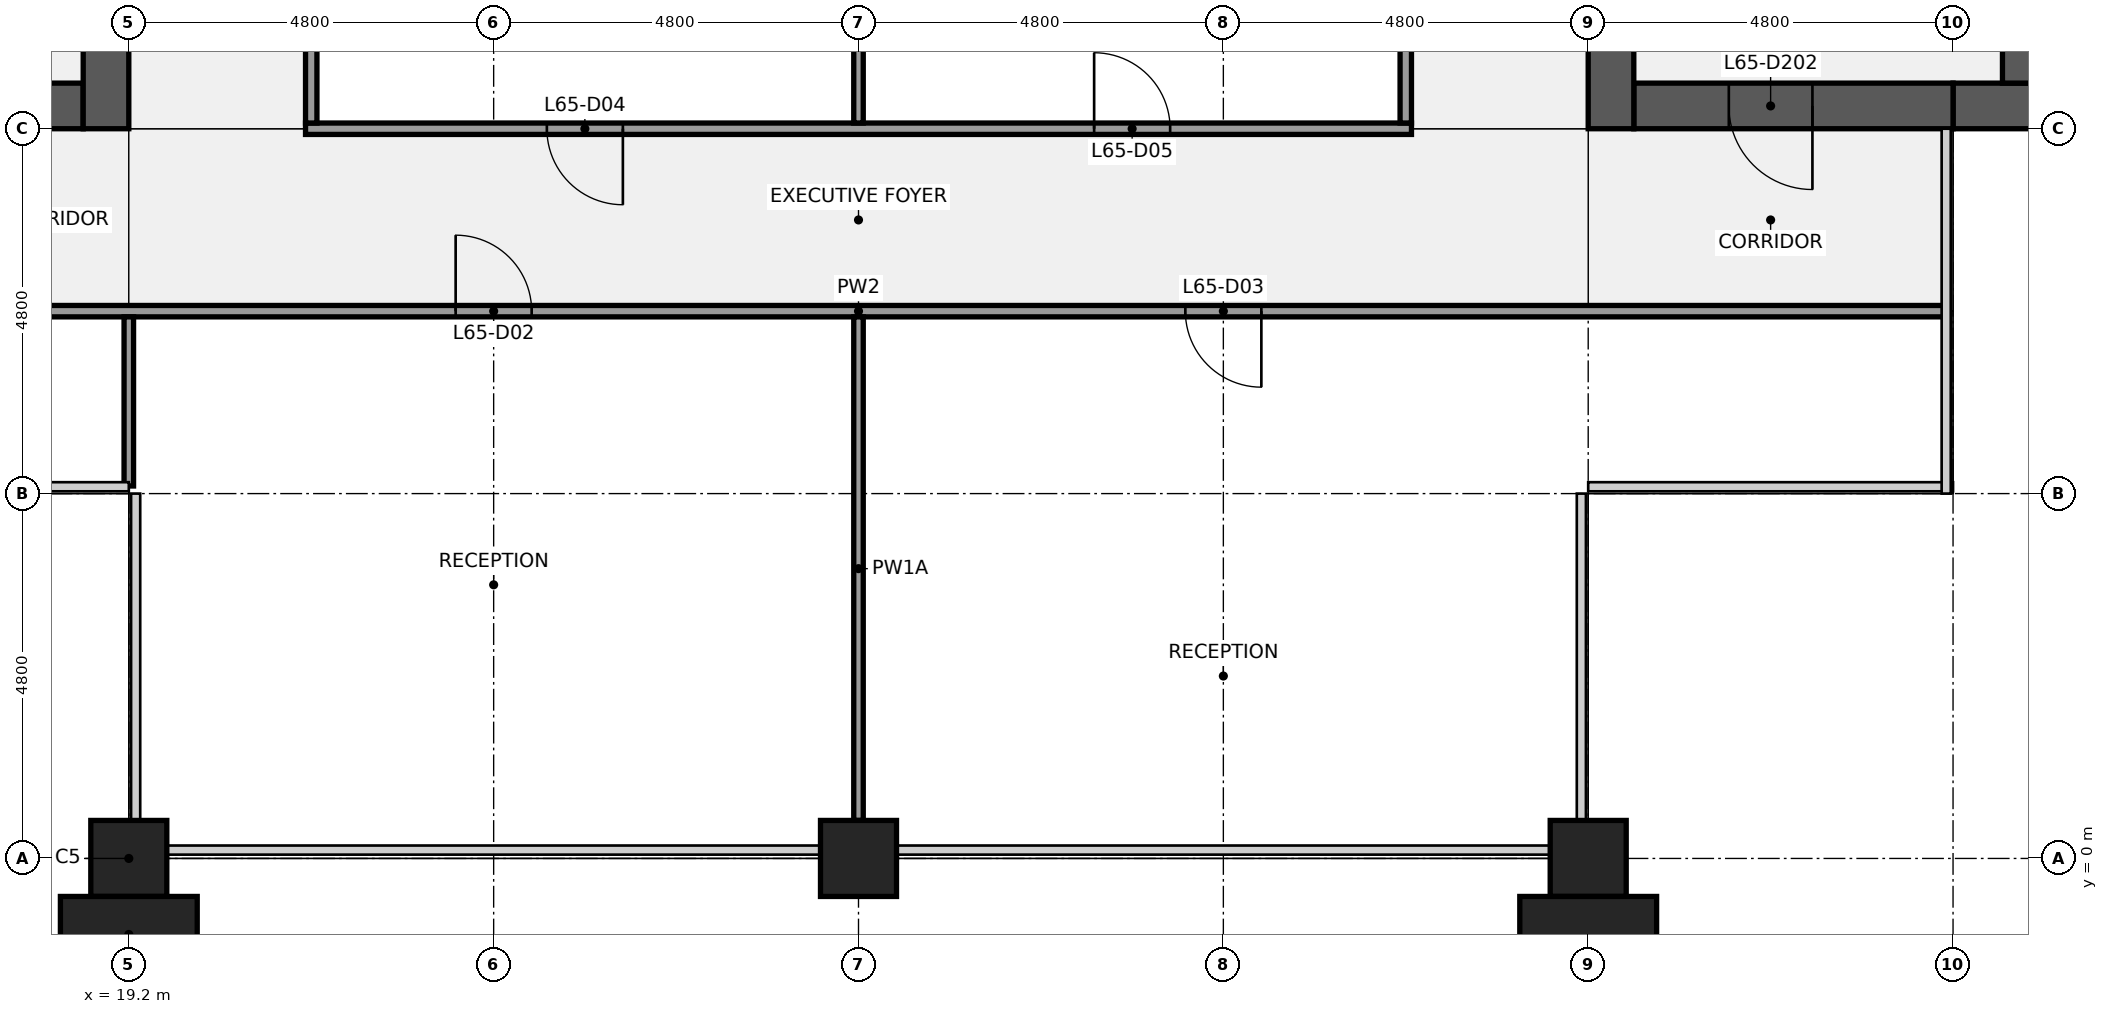
"""IFC4 building model, lengths in metres.
Left out: names, types, materials, properties, quantities, classifications, styles, units other than length and angle.
Written with IfcOpenShell. Run it as: python <this file> out.ifc"""

import sys

from ifc_helpers import new_model, si_unit, direction, frame, frame_2d, origin, origin_2d, place, context, subcontext, project, spatial, rectangle, extrude, element, fill, save


model = new_model("IFC4")
c1 = context("Model", 3, precision=1e-05, world=origin(), true_north=direction((0.0, 1.0)))
c2 = subcontext(c1, "Body", "Model", "MODEL_VIEW")
j1 = project(units=[si_unit("LENGTHUNIT", "METRE"), si_unit("PLANEANGLEUNIT", "RADIAN")], contexts=[c1])
p1 = place(None, origin())
s1 = spatial("IfcSite", under=j1, at=p1, CompositionType="ELEMENT")
p2 = place(p1, origin())
s2 = spatial("IfcBuilding", under=s1, at=p2, CompositionType="ELEMENT")
p3 = place(p2, frame((0.0, 0.0, 298.3)))
s3 = spatial("IfcBuildingStorey", under=s2, at=p3, CompositionType="ELEMENT", Elevation=298.3)
for number, where, z_axis, x_axis in (
    (1, (19.2, 0.0, 0.0), (0.0, 0.0, 1.0), (1.0, 0.0, 0.0)),
    (2, (28.8, 0.0, 0.0), (0.0, 0.0, 1.0), (1.0, 0.0, 0.0)),
    (3, (38.4, 0.0, 0.0), (0.0, 0.0, 1.0), (1.0, 0.0, 0.0)),
):
    element("IfcColumn", number, at=place(p3, frame(where, z_axis=z_axis, x_axis=x_axis)), inside=s3, PredefinedType="COLUMN", context=c2, shape_type="SweptSolid", body=[
        extrude(rectangle(XDim=1.0, YDim=1.0, at=origin_2d()), origin(), (0.0, 0.0, 1.0), 4.0),
    ])
p4 = place(p3, frame((18.6, 9.9, 0.0), z_axis=(0.0, 0.0, 1.0), x_axis=(-1.0, 0.0, 0.0)))
e4 = element("IfcWall", 4, at=p4, inside=s3, PredefinedType="SHEAR", context=c2, shape_type="SweptSolid", body=[
    extrude(rectangle(XDim=4.2, YDim=0.6, at=frame_2d((2.1, 0.0))), origin(), (0.0, 0.0, 1.0), 3.84),
])
p5 = place(p4, frame((1.25, 0.0, 0.0)))
e5 = element("IfcOpeningElement", 5, at=p5, cuts=e4, PredefinedType="OPENING", context=c2, shape_type="SweptSolid", body=[
    extrude(rectangle(XDim=1.1, YDim=2.1, at=frame_2d((0.55, 1.05))), frame((0.0, 0.31, 0.0), z_axis=(0.0, -1.0, 0.0), x_axis=(1.0, 0.0, 0.0)), (0.0, 0.0, 1.0), 0.62),
])
p6 = place(p3, frame((18.9, 38.4, 0.0), z_axis=(0.0, 0.0, 1.0), x_axis=(0.0, -1.0, 0.0)))
e6 = element("IfcWall", 6, at=p6, inside=s3, PredefinedType="SHEAR", context=c2, shape_type="SweptSolid", body=[
    extrude(rectangle(XDim=28.8, YDim=0.6, at=frame_2d((14.4, 0.0))), origin(), (0.0, 0.0, 1.0), 3.84),
])
p7 = place(p6, frame((18.3, 0.0, 0.0)))
e7 = element("IfcOpeningElement", 7, at=p7, cuts=e6, PredefinedType="OPENING", context=c2, shape_type="SweptSolid", body=[
    extrude(rectangle(XDim=1.8, YDim=2.1, at=frame_2d((0.9, 1.05))), frame((0.0, 0.31, 0.0), z_axis=(0.0, -1.0, 0.0), x_axis=(1.0, 0.0, 0.0)), (0.0, 0.0, 1.0), 0.62),
])
p8 = place(p6, frame((8.7, 0.0, 0.0)))
e8 = element("IfcOpeningElement", 8, at=p8, cuts=e6, PredefinedType="OPENING", context=c2, shape_type="SweptSolid", body=[
    extrude(rectangle(XDim=1.8, YDim=2.1, at=frame_2d((0.9, 1.05))), frame((0.0, 0.31, 0.0), z_axis=(0.0, -1.0, 0.0), x_axis=(1.0, 0.0, 0.0)), (0.0, 0.0, 1.0), 0.62),
])
p9 = place(p3, frame((57.0, 9.9, 0.0), z_axis=(0.0, 0.0, 1.0), x_axis=(-1.0, 0.0, 0.0)))
e9 = element("IfcWall", 9, at=p9, inside=s3, PredefinedType="SHEAR", context=c2, shape_type="SweptSolid", body=[
    extrude(rectangle(XDim=13.8, YDim=0.6, at=frame_2d((6.9, 0.0))), origin(), (0.0, 0.0, 1.0), 3.84),
])
p10 = place(p9, frame((5.7, 0.0, 0.9)))
e10 = element("IfcOpeningElement", 10, at=p10, cuts=e9, PredefinedType="OPENING", context=c2, shape_type="SweptSolid", body=[
    extrude(rectangle(XDim=1.8, YDim=1.5, at=frame_2d((0.9, 0.75))), frame((0.0, 0.31, 0.0), z_axis=(0.0, -1.0, 0.0), x_axis=(1.0, 0.0, 0.0)), (0.0, 0.0, 1.0), 0.62),
])
p11 = place(p9, frame((10.5, 0.0, 0.9)))
e11 = element("IfcOpeningElement", 11, at=p11, cuts=e9, PredefinedType="OPENING", context=c2, shape_type="SweptSolid", body=[
    extrude(rectangle(XDim=1.8, YDim=1.5, at=frame_2d((0.9, 0.75))), frame((0.0, 0.31, 0.0), z_axis=(0.0, -1.0, 0.0), x_axis=(1.0, 0.0, 0.0)), (0.0, 0.0, 1.0), 0.62),
])
p12 = place(p3, frame((43.2, 9.9, 0.0), z_axis=(0.0, 0.0, 1.0), x_axis=(-1.0, 0.0, 0.0)))
e12 = element("IfcWall", 12, at=p12, inside=s3, PredefinedType="SHEAR", context=c2, shape_type="SweptSolid", body=[
    extrude(rectangle(XDim=4.2, YDim=0.6, at=frame_2d((2.1, 0.0))), origin(), (0.0, 0.0, 1.0), 3.84),
])
p13 = place(p12, frame((1.85, 0.0, 0.0)))
e13 = element("IfcOpeningElement", 13, at=p13, cuts=e12, PredefinedType="OPENING", context=c2, shape_type="SweptSolid", body=[
    extrude(rectangle(XDim=1.1, YDim=2.1, at=frame_2d((0.55, 1.05))), frame((0.0, 0.31, 0.0), z_axis=(0.0, -1.0, 0.0), x_axis=(1.0, 0.0, 0.0)), (0.0, 0.0, 1.0), 0.62),
])
p14 = place(p3, frame((38.7, 9.6, 0.0), z_axis=(0.0, 0.0, 1.0), x_axis=(0.0, 1.0, 0.0)))
e14 = element("IfcWall", 14, at=p14, inside=s3, PredefinedType="SHEAR", context=c2, shape_type="SweptSolid", body=[
    extrude(rectangle(XDim=28.8, YDim=0.6, at=frame_2d((14.4, 0.0))), origin(), (0.0, 0.0, 1.0), 3.84),
])
p15 = place(p14, frame((8.7, 0.0, 0.0)))
e15 = element("IfcOpeningElement", 15, at=p15, cuts=e14, PredefinedType="OPENING", context=c2, shape_type="SweptSolid", body=[
    extrude(rectangle(XDim=1.8, YDim=2.1, at=frame_2d((0.9, 1.05))), frame((0.0, 0.31, 0.0), z_axis=(0.0, -1.0, 0.0), x_axis=(1.0, 0.0, 0.0)), (0.0, 0.0, 1.0), 0.62),
])
p16 = place(p14, frame((18.3, 0.0, 0.0)))
e16 = element("IfcOpeningElement", 16, at=p16, cuts=e14, PredefinedType="OPENING", context=c2, shape_type="SweptSolid", body=[
    extrude(rectangle(XDim=1.8, YDim=2.1, at=frame_2d((0.9, 1.05))), frame((0.0, 0.31, 0.0), z_axis=(0.0, -1.0, 0.0), x_axis=(1.0, 0.0, 0.0)), (0.0, 0.0, 1.0), 0.62),
])
p17 = place(p3, frame((43.85, 10.5, 0.0), z_axis=(0.0, 0.0, 1.0), x_axis=(1.0, 0.0, 0.0)))
e17 = element("IfcWall", 17, at=p17, inside=s3, PredefinedType="SHEAR", context=c2, shape_type="SweptSolid", body=[
    extrude(rectangle(XDim=7.5, YDim=0.6, at=frame_2d((3.75, 0.0))), origin(), (0.0, 0.0, 1.0), 3.84),
])
p18 = place(p3, frame((14.5, 7.2, 0.0), z_axis=(0.0, 0.0, 1.0), x_axis=(1.0, 0.0, 0.0)))
e18 = element("IfcWall", 18, at=p18, inside=s3, PredefinedType="PARTITIONING", context=c2, shape_type="SweptSolid", body=[
    extrude(rectangle(XDim=28.6, YDim=0.15, at=frame_2d((14.3, 0.0))), origin(), (0.0, 0.0, 1.0), 2.849),
])
p19 = place(p18, frame((1.85, 0.0, 0.0)))
e19 = element("IfcOpeningElement", 19, at=p19, cuts=e18, PredefinedType="OPENING", context=c2, shape_type="SweptSolid", body=[
    extrude(rectangle(XDim=1.0, YDim=2.1, at=frame_2d((0.5, 1.05))), frame((0.0, 0.085, 0.0), z_axis=(0.0, -1.0, 0.0), x_axis=(1.0, 0.0, 0.0)), (0.0, 0.0, 1.0), 0.17),
])
p20 = place(p18, frame((9.0, 0.0, 0.0)))
e20 = element("IfcOpeningElement", 20, at=p20, cuts=e18, PredefinedType="OPENING", context=c2, shape_type="SweptSolid", body=[
    extrude(rectangle(XDim=1.0, YDim=2.1, at=frame_2d((0.5, 1.05))), frame((0.0, 0.085, 0.0), z_axis=(0.0, -1.0, 0.0), x_axis=(1.0, 0.0, 0.0)), (0.0, 0.0, 1.0), 0.17),
])
p21 = place(p18, frame((18.6, 0.0, 0.0)))
e21 = element("IfcOpeningElement", 21, at=p21, cuts=e18, PredefinedType="OPENING", context=c2, shape_type="SweptSolid", body=[
    extrude(rectangle(XDim=1.0, YDim=2.1, at=frame_2d((0.5, 1.05))), frame((0.0, 0.085, 0.0), z_axis=(0.0, -1.0, 0.0), x_axis=(1.0, 0.0, 0.0)), (0.0, 0.0, 1.0), 0.17),
])
p22 = place(p3, frame((21.525, 9.6, 0.0), z_axis=(0.0, 0.0, 1.0), x_axis=(1.0, 0.0, 0.0)))
e22 = element("IfcWall", 22, at=p22, inside=s3, PredefinedType="PARTITIONING", context=c2, shape_type="SweptSolid", body=[
    extrude(rectangle(XDim=14.55, YDim=0.15, at=frame_2d((7.275, 0.0))), origin(), (0.0, 0.0, 1.0), 2.849),
])
p23 = place(p22, frame((3.175, 0.0, 0.0)))
e23 = element("IfcOpeningElement", 23, at=p23, cuts=e22, PredefinedType="OPENING", context=c2, shape_type="SweptSolid", body=[
    extrude(rectangle(XDim=1.0, YDim=2.1, at=frame_2d((0.5, 1.05))), frame((0.0, 0.085, 0.0), z_axis=(0.0, -1.0, 0.0), x_axis=(1.0, 0.0, 0.0)), (0.0, 0.0, 1.0), 0.17),
])
p24 = place(p22, frame((10.375, 0.0, 0.0)))
e24 = element("IfcOpeningElement", 24, at=p24, cuts=e22, PredefinedType="OPENING", context=c2, shape_type="SweptSolid", body=[
    extrude(rectangle(XDim=1.0, YDim=2.1, at=frame_2d((0.5, 1.05))), frame((0.0, 0.085, 0.0), z_axis=(0.0, -1.0, 0.0), x_axis=(1.0, 0.0, 0.0)), (0.0, 0.0, 1.0), 0.17),
])
p25 = place(p3, frame((19.2, 4.9, 0.0), z_axis=(0.0, 0.0, 1.0), x_axis=(0.0, 1.0, 0.0)))
e25 = element("IfcWall", 25, at=p25, inside=s3, PredefinedType="PARTITIONING", context=c2, shape_type="SweptSolid", body=[
    extrude(rectangle(XDim=2.225, YDim=0.125, at=frame_2d((1.113, 0.0))), origin(), (0.0, 0.0, 1.0), 2.849),
])
p26 = place(p3, frame((21.6, 9.675, 0.0), z_axis=(0.0, 0.0, 1.0), x_axis=(0.0, 1.0, 0.0)))
e26 = element("IfcWall", 26, at=p26, inside=s3, PredefinedType="PARTITIONING", context=c2, shape_type="SweptSolid", body=[
    extrude(rectangle(XDim=4.65, YDim=0.15, at=frame_2d((2.325, 0.0))), origin(), (0.0, 0.0, 1.0), 2.849),
])
p27 = place(p3, frame((28.8, 0.5, 0.0), z_axis=(0.0, 0.0, 1.0), x_axis=(0.0, 1.0, 0.0)))
e27 = element("IfcWall", 27, at=p27, inside=s3, PredefinedType="PARTITIONING", context=c2, shape_type="SweptSolid", body=[
    extrude(rectangle(XDim=6.625, YDim=0.125, at=frame_2d((3.312, 0.0))), origin(), (0.0, 0.0, 1.0), 2.849),
])
p28 = place(p3, frame((28.8, 9.675, 0.0), z_axis=(0.0, 0.0, 1.0), x_axis=(0.0, 1.0, 0.0)))
e28 = element("IfcWall", 28, at=p28, inside=s3, PredefinedType="PARTITIONING", context=c2, shape_type="SweptSolid", body=[
    extrude(rectangle(XDim=4.662, YDim=0.125, at=frame_2d((2.331, 0.0))), origin(), (0.0, 0.0, 1.0), 2.849),
])
p29 = place(p3, frame((36.0, 9.675, 0.0), z_axis=(0.0, 0.0, 1.0), x_axis=(0.0, 1.0, 0.0)))
e29 = element("IfcWall", 29, at=p29, inside=s3, PredefinedType="PARTITIONING", context=c2, shape_type="SweptSolid", body=[
    extrude(rectangle(XDim=4.65, YDim=0.15, at=frame_2d((2.325, 0.0))), origin(), (0.0, 0.0, 1.0), 2.849),
])
for number, where, z_axis, x_axis in (
    (30, (19.2, -1.0, 0.0), (0.0, 0.0, 1.0), (1.0, 0.0, 0.0)),
    (31, (38.4, -1.0, 0.0), (0.0, 0.0, 1.0), (1.0, 0.0, 0.0)),
):
    element("IfcColumn", number, at=place(p3, frame(where, z_axis=z_axis, x_axis=x_axis)), inside=s3, PredefinedType="PILASTER", context=c2, shape_type="SweptSolid", body=[
        extrude(rectangle(XDim=1.8, YDim=1.0, at=origin_2d()), origin(), (0.0, 0.0, 1.0), 4.0),
    ])
p30 = place(p13, origin())
e32 = element("IfcDoor", 32, at=p30, inside=s3, OperationType="SINGLE_SWING_LEFT", PredefinedType="DOOR", context=c2, shape_type="SweptSolid", body=[
    extrude(rectangle(XDim=1.1, YDim=2.1, at=frame_2d((0.55, 1.05))), frame((0.0, 0.025, 0.0), z_axis=(0.0, -1.0, 0.0), x_axis=(1.0, 0.0, 0.0)), (0.0, 0.0, 1.0), 0.05),
])
fill(e13, e32)
p31 = place(p20, origin())
e33 = element("IfcDoor", 33, at=p31, inside=s3, OperationType="SINGLE_SWING_LEFT", PredefinedType="DOOR", context=c2, shape_type="SweptSolid", body=[
    extrude(rectangle(XDim=1.0, YDim=2.1, at=frame_2d((0.5, 1.05))), frame((0.0, 0.025, 0.0), z_axis=(0.0, -1.0, 0.0), x_axis=(1.0, 0.0, 0.0)), (0.0, 0.0, 1.0), 0.05),
])
fill(e20, e33)
p32 = place(p21, origin())
e34 = element("IfcDoor", 34, at=p32, inside=s3, OperationType="SINGLE_SWING_RIGHT", PredefinedType="DOOR", context=c2, shape_type="SweptSolid", body=[
    extrude(rectangle(XDim=1.0, YDim=2.1, at=frame_2d((0.5, 1.05))), frame((0.0, 0.025, 0.0), z_axis=(0.0, -1.0, 0.0), x_axis=(1.0, 0.0, 0.0)), (0.0, 0.0, 1.0), 0.05),
])
fill(e21, e34)
p33 = place(p23, origin())
e35 = element("IfcDoor", 35, at=p33, inside=s3, OperationType="SINGLE_SWING_RIGHT", PredefinedType="DOOR", context=c2, shape_type="SweptSolid", body=[
    extrude(rectangle(XDim=1.0, YDim=2.1, at=frame_2d((0.5, 1.05))), frame((0.0, 0.025, 0.0), z_axis=(0.0, -1.0, 0.0), x_axis=(1.0, 0.0, 0.0)), (0.0, 0.0, 1.0), 0.05),
])
fill(e23, e35)
p34 = place(p24, origin())
e36 = element("IfcDoor", 36, at=p34, inside=s3, OperationType="SINGLE_SWING_LEFT", PredefinedType="DOOR", context=c2, shape_type="SweptSolid", body=[
    extrude(rectangle(XDim=1.0, YDim=2.1, at=frame_2d((0.5, 1.05))), frame((0.0, 0.025, 0.0), z_axis=(0.0, -1.0, 0.0), x_axis=(1.0, 0.0, 0.0)), (0.0, 0.0, 1.0), 0.05),
])
fill(e24, e36)
save(model, sys.argv[1])
